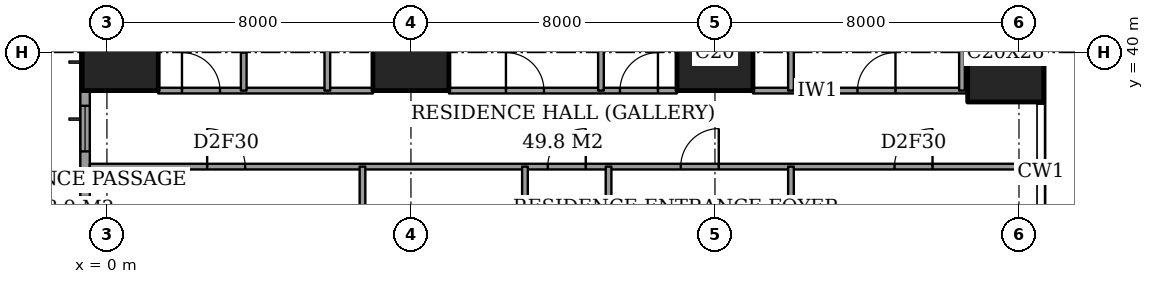
"""IFC4 building model, lengths in metres.
Left out: names, types, materials, properties, quantities, classifications, styles, units other than length and angle.
Written with IfcOpenShell. Run it as: python <this file> out.ifc"""

import sys

from ifc_helpers import new_model, si_unit, direction, frame, frame_2d, origin, origin_2d, place, context, subcontext, project, spatial, rectangle, extrude, element, fill, save


model = new_model("IFC4")
c1 = context("Model", 3, precision=1e-05, world=origin(), true_north=direction((0.0, 1.0)))
c2 = subcontext(c1, "Body", "Model", "MODEL_VIEW")
j1 = project(units=[si_unit("LENGTHUNIT", "METRE"), si_unit("PLANEANGLEUNIT", "RADIAN")], contexts=[c1])
p1 = place(None, origin())
s1 = spatial("IfcSite", under=j1, at=p1, CompositionType="ELEMENT")
p2 = place(p1, origin())
s2 = spatial("IfcBuilding", under=s1, at=p2, CompositionType="ELEMENT")
p3 = place(p2, frame((0.0, 0.0, 33.2)))
s3 = spatial("IfcBuildingStorey", under=s2, at=p3, CompositionType="ELEMENT", Elevation=33.2)
for number, where, z_axis, x_axis in (
    (1, (0.35, 40.0, 0.0), (0.0, 0.0, 1.0), (1.0, 0.0, 0.0)),
    (2, (8.0, 40.0, 0.0), (0.0, 0.0, 1.0), (1.0, 0.0, 0.0)),
    (3, (16.0, 40.0, 0.0), (0.0, 0.0, 1.0), (1.0, 0.0, 0.0)),
):
    element("IfcColumn", number, at=place(p3, frame(where, z_axis=z_axis, x_axis=x_axis)), inside=s3, PredefinedType="COLUMN", context=c2, shape_type="SweptSolid", body=[
        extrude(rectangle(XDim=2.0, YDim=2.0, at=origin_2d()), origin(), (0.0, 0.0, 1.0), 3.6),
    ])
p4 = place(p3, frame((23.65, 40.0, 0.0), z_axis=(0.0, 0.0, 1.0), x_axis=(1.0, 0.0, 0.0)))
e4 = element("IfcColumn", 4, at=p4, inside=s3, PredefinedType="COLUMN", context=c2, shape_type="SweptSolid", body=[
    extrude(rectangle(XDim=2.0, YDim=2.6, at=origin_2d()), origin(), (0.0, 0.0, 1.0), 3.6),
])
p5 = place(p3, frame((-0.575, 44.825, 0.0), z_axis=(0.0, 0.0, 1.0), x_axis=(0.0, -1.0, 0.0)))
e5 = element("IfcWall", 5, at=p5, inside=s3, PredefinedType="SOLIDWALL", context=c2, shape_type="SweptSolid", body=[
    extrude(rectangle(XDim=41.65, YDim=0.25, at=frame_2d((20.825, 0.0))), origin(), (0.0, 0.0, 1.0), 3.6),
])
p6 = place(p5, frame((0.775, 0.0, 0.6)))
e6 = element("IfcOpeningElement", 6, at=p6, cuts=e5, PredefinedType="OPENING", context=c2, shape_type="SweptSolid", body=[
    extrude(rectangle(XDim=2.4, YDim=2.0, at=frame_2d((1.2, 1.0))), frame((0.0, 0.135, 0.0), z_axis=(0.0, -1.0, 0.0), x_axis=(1.0, 0.0, 0.0)), (0.0, 0.0, 1.0), 0.27),
])
p7 = place(p5, frame((6.225, 0.0, 0.6)))
e7 = element("IfcOpeningElement", 7, at=p7, cuts=e5, PredefinedType="OPENING", context=c2, shape_type="SweptSolid", body=[
    extrude(rectangle(XDim=1.2, YDim=2.0, at=frame_2d((0.6, 1.0))), frame((0.0, 0.135, 0.0), z_axis=(0.0, -1.0, 0.0), x_axis=(1.0, 0.0, 0.0)), (0.0, 0.0, 1.0), 0.27),
])
p8 = place(p5, frame((8.625, 0.0, 0.6)))
e8 = element("IfcOpeningElement", 8, at=p8, cuts=e5, PredefinedType="OPENING", context=c2, shape_type="SweptSolid", body=[
    extrude(rectangle(XDim=2.4, YDim=2.0, at=frame_2d((1.2, 1.0))), frame((0.0, 0.135, 0.0), z_axis=(0.0, -1.0, 0.0), x_axis=(1.0, 0.0, 0.0)), (0.0, 0.0, 1.0), 0.27),
])
p9 = place(p5, frame((15.625, 0.0, 0.6)))
e9 = element("IfcOpeningElement", 9, at=p9, cuts=e5, PredefinedType="OPENING", context=c2, shape_type="SweptSolid", body=[
    extrude(rectangle(XDim=2.4, YDim=2.0, at=frame_2d((1.2, 1.0))), frame((0.0, 0.135, 0.0), z_axis=(0.0, -1.0, 0.0), x_axis=(1.0, 0.0, 0.0)), (0.0, 0.0, 1.0), 0.27),
])
p10 = place(p5, frame((23.625, 0.0, 0.6)))
e10 = element("IfcOpeningElement", 10, at=p10, cuts=e5, PredefinedType="OPENING", context=c2, shape_type="SweptSolid", body=[
    extrude(rectangle(XDim=2.4, YDim=2.0, at=frame_2d((1.2, 1.0))), frame((0.0, 0.135, 0.0), z_axis=(0.0, -1.0, 0.0), x_axis=(1.0, 0.0, 0.0)), (0.0, 0.0, 1.0), 0.27),
])
p11 = place(p5, frame((30.825, 0.0, 0.6)))
e11 = element("IfcOpeningElement", 11, at=p11, cuts=e5, PredefinedType="OPENING", context=c2, shape_type="SweptSolid", body=[
    extrude(rectangle(XDim=2.4, YDim=2.0, at=frame_2d((1.2, 1.0))), frame((0.0, 0.135, 0.0), z_axis=(0.0, -1.0, 0.0), x_axis=(1.0, 0.0, 0.0)), (0.0, 0.0, 1.0), 0.27),
])
p12 = place(p5, frame((34.5, 0.0, 0.6)))
e12 = element("IfcOpeningElement", 12, at=p12, cuts=e5, PredefinedType="OPENING", context=c2, shape_type="SweptSolid", body=[
    extrude(rectangle(XDim=1.2, YDim=2.0, at=frame_2d((0.6, 1.0))), frame((0.0, 0.135, 0.0), z_axis=(0.0, -1.0, 0.0), x_axis=(1.0, 0.0, 0.0)), (0.0, 0.0, 1.0), 0.27),
])
p13 = place(p5, frame((38.475, 0.0, 0.6)))
e13 = element("IfcOpeningElement", 13, at=p13, cuts=e5, PredefinedType="OPENING", context=c2, shape_type="SweptSolid", body=[
    extrude(rectangle(XDim=2.4, YDim=2.0, at=frame_2d((1.2, 1.0))), frame((0.0, 0.135, 0.0), z_axis=(0.0, -1.0, 0.0), x_axis=(1.0, 0.0, 0.0)), (0.0, 0.0, 1.0), 0.27),
])
p14 = place(p3, frame((-0.45, 37.0, 0.0), z_axis=(0.0, 0.0, 1.0), x_axis=(1.0, 0.0, 0.0)))
e14 = element("IfcWall", 14, at=p14, inside=s3, PredefinedType="PARTITIONING", context=c2, shape_type="SweptSolid", body=[
    extrude(rectangle(XDim=25.011, YDim=0.15, at=frame_2d((12.505, 0.0))), origin(), (0.0, 0.0, 1.0), 3.35),
])
p15 = place(p14, frame((12.05, 0.0, 0.0)))
e15 = element("IfcOpeningElement", 15, at=p15, cuts=e14, PredefinedType="OPENING", context=c2, shape_type="SweptSolid", body=[
    extrude(rectangle(XDim=1.0, YDim=2.1, at=frame_2d((0.5, 1.05))), frame((0.0, 0.085, 0.0), z_axis=(0.0, -1.0, 0.0), x_axis=(1.0, 0.0, 0.0)), (0.0, 0.0, 1.0), 0.17),
])
p16 = place(p14, frame((3.087, 0.0, 0.0)))
e16 = element("IfcOpeningElement", 16, at=p16, cuts=e14, PredefinedType="OPENING", context=c2, shape_type="SweptSolid", body=[
    extrude(rectangle(XDim=1.0, YDim=2.1, at=frame_2d((0.5, 1.05))), frame((0.0, 0.085, 0.0), z_axis=(0.0, -1.0, 0.0), x_axis=(1.0, 0.0, 0.0)), (0.0, 0.0, 1.0), 0.17),
])
p17 = place(p14, frame((15.55, 0.0, 0.0)))
e17 = element("IfcOpeningElement", 17, at=p17, cuts=e14, PredefinedType="OPENING", context=c2, shape_type="SweptSolid", body=[
    extrude(rectangle(XDim=1.0, YDim=2.1, at=frame_2d((0.5, 1.05))), frame((0.0, 0.085, 0.0), z_axis=(0.0, -1.0, 0.0), x_axis=(1.0, 0.0, 0.0)), (0.0, 0.0, 1.0), 0.17),
])
p18 = place(p14, frame((21.175, 0.0, 0.0)))
e18 = element("IfcOpeningElement", 18, at=p18, cuts=e14, PredefinedType="OPENING", context=c2, shape_type="SweptSolid", body=[
    extrude(rectangle(XDim=1.0, YDim=2.1, at=frame_2d((0.5, 1.05))), frame((0.0, 0.085, 0.0), z_axis=(0.0, -1.0, 0.0), x_axis=(1.0, 0.0, 0.0)), (0.0, 0.0, 1.0), 0.17),
])
p19 = place(p3, frame((1.35, 39.0, 0.0), z_axis=(0.0, 0.0, 1.0), x_axis=(1.0, 0.0, 0.0)))
e19 = element("IfcWall", 19, at=p19, inside=s3, PredefinedType="PARTITIONING", context=c2, shape_type="SweptSolid", body=[
    extrude(rectangle(XDim=5.65, YDim=0.15, at=frame_2d((2.825, 0.0))), origin(), (0.0, 0.0, 1.0), 3.35),
])
p20 = place(p19, frame((0.625, 0.0, 0.0)))
e20 = element("IfcOpeningElement", 20, at=p20, cuts=e19, PredefinedType="OPENING", context=c2, shape_type="SweptSolid", body=[
    extrude(rectangle(XDim=1.0, YDim=2.1, at=frame_2d((0.5, 1.05))), frame((0.0, 0.085, 0.0), z_axis=(0.0, -1.0, 0.0), x_axis=(1.0, 0.0, 0.0)), (0.0, 0.0, 1.0), 0.17),
])
p21 = place(p3, frame((9.0, 39.0, 0.0), z_axis=(0.0, 0.0, 1.0), x_axis=(1.0, 0.0, 0.0)))
e21 = element("IfcWall", 21, at=p21, inside=s3, PredefinedType="PARTITIONING", context=c2, shape_type="SweptSolid", body=[
    extrude(rectangle(XDim=6.0, YDim=0.15, at=frame_2d((3.0, 0.0))), origin(), (0.0, 0.0, 1.0), 3.35),
])
p22 = place(p21, frame((1.5, 0.0, 0.0)))
e22 = element("IfcOpeningElement", 22, at=p22, cuts=e21, PredefinedType="OPENING", context=c2, shape_type="SweptSolid", body=[
    extrude(rectangle(XDim=1.0, YDim=2.1, at=frame_2d((0.5, 1.05))), frame((0.0, 0.085, 0.0), z_axis=(0.0, -1.0, 0.0), x_axis=(1.0, 0.0, 0.0)), (0.0, 0.0, 1.0), 0.17),
])
p23 = place(p21, frame((4.5, 0.0, 0.0)))
e23 = element("IfcOpeningElement", 23, at=p23, cuts=e21, PredefinedType="OPENING", context=c2, shape_type="SweptSolid", body=[
    extrude(rectangle(XDim=1.0, YDim=2.1, at=frame_2d((0.5, 1.05))), frame((0.0, 0.085, 0.0), z_axis=(0.0, -1.0, 0.0), x_axis=(1.0, 0.0, 0.0)), (0.0, 0.0, 1.0), 0.17),
])
p24 = place(p3, frame((17.0, 39.0, 0.0), z_axis=(0.0, 0.0, 1.0), x_axis=(1.0, 0.0, 0.0)))
e24 = element("IfcWall", 24, at=p24, inside=s3, PredefinedType="PARTITIONING", context=c2, shape_type="SweptSolid", body=[
    extrude(rectangle(XDim=5.65, YDim=0.15, at=frame_2d((2.825, 0.0))), origin(), (0.0, 0.0, 1.0), 3.35),
])
p25 = place(p24, frame((2.75, 0.0, 0.0)))
e25 = element("IfcOpeningElement", 25, at=p25, cuts=e24, PredefinedType="OPENING", context=c2, shape_type="SweptSolid", body=[
    extrude(rectangle(XDim=1.0, YDim=2.1, at=frame_2d((0.5, 1.05))), frame((0.0, 0.085, 0.0), z_axis=(0.0, -1.0, 0.0), x_axis=(1.0, 0.0, 0.0)), (0.0, 0.0, 1.0), 0.17),
])
p26 = place(p3, frame((3.6, 39.0, 0.0), z_axis=(0.0, 0.0, 1.0), x_axis=(0.0, 1.0, 0.0)))
e26 = element("IfcWall", 26, at=p26, inside=s3, PredefinedType="PARTITIONING", context=c2, shape_type="SweptSolid", body=[
    extrude(rectangle(XDim=2.9, YDim=0.15, at=frame_2d((1.45, 0.0))), origin(), (0.0, 0.0, 1.0), 3.35),
])
p27 = place(p26, frame((1.0, 0.0, 0.0)))
e27 = element("IfcOpeningElement", 27, at=p27, cuts=e26, PredefinedType="OPENING", context=c2, shape_type="SweptSolid", body=[
    extrude(rectangle(XDim=0.9, YDim=2.1, at=frame_2d((0.45, 1.05))), frame((0.0, 0.085, 0.0), z_axis=(0.0, -1.0, 0.0), x_axis=(1.0, 0.0, 0.0)), (0.0, 0.0, 1.0), 0.17),
])
p28 = place(p3, frame((5.8, 39.0, 0.0), z_axis=(0.0, 0.0, 1.0), x_axis=(0.0, 1.0, 0.0)))
e28 = element("IfcWall", 28, at=p28, inside=s3, PredefinedType="PARTITIONING", context=c2, shape_type="SweptSolid", body=[
    extrude(rectangle(XDim=9.45, YDim=0.15, at=frame_2d((4.725, 0.0))), origin(), (0.0, 0.0, 1.0), 3.35),
])
p29 = place(p3, frame((6.725, 33.2, 0.0), z_axis=(0.0, 0.0, 1.0), x_axis=(0.0, 1.0, 0.0)))
e29 = element("IfcWall", 29, at=p29, inside=s3, PredefinedType="PARTITIONING", context=c2, shape_type="SweptSolid", body=[
    extrude(rectangle(XDim=3.8, YDim=0.15, at=frame_2d((1.9, 0.0))), origin(), (0.0, 0.0, 1.0), 3.35),
])
p30 = place(p29, frame((1.75, 0.0, 0.0)))
e30 = element("IfcOpeningElement", 30, at=p30, cuts=e29, PredefinedType="OPENING", context=c2, shape_type="SweptSolid", body=[
    extrude(rectangle(XDim=0.9, YDim=2.1, at=frame_2d((0.45, 1.05))), frame((0.0, 0.085, 0.0), z_axis=(0.0, -1.0, 0.0), x_axis=(1.0, 0.0, 0.0)), (0.0, 0.0, 1.0), 0.17),
])
p31 = place(p3, frame((11.0, 28.0, 0.0), z_axis=(0.0, 0.0, 1.0), x_axis=(0.0, 1.0, 0.0)))
e31 = element("IfcWall", 31, at=p31, inside=s3, PredefinedType="PARTITIONING", context=c2, shape_type="SweptSolid", body=[
    extrude(rectangle(XDim=9.0, YDim=0.15, at=frame_2d((4.5, 0.0))), origin(), (0.0, 0.0, 1.0), 3.35),
])
p32 = place(p31, frame((0.837, 0.0, 0.0)))
e32 = element("IfcOpeningElement", 32, at=p32, cuts=e31, PredefinedType="OPENING", context=c2, shape_type="SweptSolid", body=[
    extrude(rectangle(XDim=1.0, YDim=2.1, at=frame_2d((0.5, 1.05))), frame((0.0, 0.085, 0.0), z_axis=(0.0, -1.0, 0.0), x_axis=(1.0, 0.0, 0.0)), (0.0, 0.0, 1.0), 0.17),
])
p33 = place(p3, frame((13.0, 39.0, 0.0), z_axis=(0.0, 0.0, 1.0), x_axis=(0.0, 1.0, 0.0)))
e33 = element("IfcWall", 33, at=p33, inside=s3, PredefinedType="PARTITIONING", context=c2, shape_type="SweptSolid", body=[
    extrude(rectangle(XDim=9.45, YDim=0.15, at=frame_2d((4.725, 0.0))), origin(), (0.0, 0.0, 1.0), 3.35),
])
p34 = place(p3, frame((13.2, 30.675, 0.0), z_axis=(0.0, 0.0, 1.0), x_axis=(0.0, 1.0, 0.0)))
e34 = element("IfcWall", 34, at=p34, inside=s3, PredefinedType="PARTITIONING", context=c2, shape_type="SweptSolid", body=[
    extrude(rectangle(XDim=6.325, YDim=0.15, at=frame_2d((3.163, 0.0))), origin(), (0.0, 0.0, 1.0), 3.35),
])
p35 = place(p3, frame((18.0, 33.0, 0.0), z_axis=(0.0, 0.0, 1.0), x_axis=(0.0, 1.0, 0.0)))
e35 = element("IfcWall", 35, at=p35, inside=s3, PredefinedType="PARTITIONING", context=c2, shape_type="SweptSolid", body=[
    extrude(rectangle(XDim=4.0, YDim=0.15, at=frame_2d((2.0, 0.0))), origin(), (0.0, 0.0, 1.0), 3.35),
])
p36 = place(p3, frame((18.0, 39.0, 0.0), z_axis=(0.0, 0.0, 1.0), x_axis=(0.0, 1.0, 0.0)))
e36 = element("IfcWall", 36, at=p36, inside=s3, PredefinedType="PARTITIONING", context=c2, shape_type="SweptSolid", body=[
    extrude(rectangle(XDim=9.45, YDim=0.15, at=frame_2d((4.725, 0.0))), origin(), (0.0, 0.0, 1.0), 3.35),
])
p37 = place(p3, frame((22.5, 39.0, 0.0), z_axis=(0.0, 0.0, 1.0), x_axis=(0.0, 1.0, 0.0)))
e37 = element("IfcWall", 37, at=p37, inside=s3, PredefinedType="PARTITIONING", context=c2, shape_type="SweptSolid", body=[
    extrude(rectangle(XDim=9.45, YDim=0.15, at=frame_2d((4.725, 0.0))), origin(), (0.0, 0.0, 1.0), 3.35),
])
p38 = place(p37, frame((4.275, 0.0, 0.0)))
e38 = element("IfcOpeningElement", 38, at=p38, cuts=e37, PredefinedType="OPENING", context=c2, shape_type="SweptSolid", body=[
    extrude(rectangle(XDim=0.9, YDim=2.1, at=frame_2d((0.45, 1.05))), frame((0.0, 0.085, 0.0), z_axis=(0.0, -1.0, 0.0), x_axis=(1.0, 0.0, 0.0)), (0.0, 0.0, 1.0), 0.17),
])
p39 = place(p7, origin())
e39 = element("IfcWindow", 39, at=p39, inside=s3, PartitioningType="SINGLE_PANEL", PredefinedType="WINDOW", context=c2, shape_type="SweptSolid", body=[
    extrude(rectangle(XDim=1.2, YDim=2.0, at=frame_2d((0.6, 1.0))), frame((0.0, 0.03, 0.0), z_axis=(0.0, -1.0, 0.0), x_axis=(1.0, 0.0, 0.0)), (0.0, 0.0, 1.0), 0.06),
])
fill(e7, e39)
p40 = place(p8, origin())
e40 = element("IfcWindow", 40, at=p40, inside=s3, PartitioningType="SINGLE_PANEL", PredefinedType="WINDOW", context=c2, shape_type="SweptSolid", body=[
    extrude(rectangle(XDim=2.4, YDim=2.0, at=frame_2d((1.2, 1.0))), frame((0.0, 0.03, 0.0), z_axis=(0.0, -1.0, 0.0), x_axis=(1.0, 0.0, 0.0)), (0.0, 0.0, 1.0), 0.06),
])
fill(e8, e40)
p41 = place(p20, origin())
e41 = element("IfcDoor", 41, at=p41, inside=s3, OperationType="SINGLE_SWING_RIGHT", PredefinedType="DOOR", context=c2, shape_type="SweptSolid", body=[
    extrude(rectangle(XDim=1.0, YDim=2.1, at=frame_2d((0.5, 1.05))), frame((0.0, 0.025, 0.0), z_axis=(0.0, -1.0, 0.0), x_axis=(1.0, 0.0, 0.0)), (0.0, 0.0, 1.0), 0.05),
])
fill(e20, e41)
p42 = place(p22, origin())
e42 = element("IfcDoor", 42, at=p42, inside=s3, OperationType="SINGLE_SWING_RIGHT", PredefinedType="DOOR", context=c2, shape_type="SweptSolid", body=[
    extrude(rectangle(XDim=1.0, YDim=2.1, at=frame_2d((0.5, 1.05))), frame((0.0, 0.025, 0.0), z_axis=(0.0, -1.0, 0.0), x_axis=(1.0, 0.0, 0.0)), (0.0, 0.0, 1.0), 0.05),
])
fill(e22, e42)
p43 = place(p23, origin())
e43 = element("IfcDoor", 43, at=p43, inside=s3, OperationType="SINGLE_SWING_LEFT", PredefinedType="DOOR", context=c2, shape_type="SweptSolid", body=[
    extrude(rectangle(XDim=1.0, YDim=2.1, at=frame_2d((0.5, 1.05))), frame((0.0, 0.025, 0.0), z_axis=(0.0, -1.0, 0.0), x_axis=(1.0, 0.0, 0.0)), (0.0, 0.0, 1.0), 0.05),
])
fill(e23, e43)
p44 = place(p25, origin())
e44 = element("IfcDoor", 44, at=p44, inside=s3, OperationType="SINGLE_SWING_LEFT", PredefinedType="DOOR", context=c2, shape_type="SweptSolid", body=[
    extrude(rectangle(XDim=1.0, YDim=2.1, at=frame_2d((0.5, 1.05))), frame((0.0, 0.025, 0.0), z_axis=(0.0, -1.0, 0.0), x_axis=(1.0, 0.0, 0.0)), (0.0, 0.0, 1.0), 0.05),
])
fill(e25, e44)
p45 = place(p15, origin())
e45 = element("IfcDoor", 45, at=p45, inside=s3, OperationType="SINGLE_SWING_LEFT", PredefinedType="DOOR", context=c2, shape_type="SweptSolid", body=[
    extrude(rectangle(XDim=1.0, YDim=2.1, at=frame_2d((0.5, 1.05))), frame((0.0, 0.025, 0.0), z_axis=(0.0, -1.0, 0.0), x_axis=(1.0, 0.0, 0.0)), (0.0, 0.0, 1.0), 0.05),
])
fill(e15, e45)
p46 = place(p16, origin())
e46 = element("IfcDoor", 46, at=p46, inside=s3, OperationType="SINGLE_SWING_RIGHT", PredefinedType="DOOR", context=c2, shape_type="SweptSolid", body=[
    extrude(rectangle(XDim=1.0, YDim=2.1, at=frame_2d((0.5, 1.05))), frame((0.0, 0.025, 0.0), z_axis=(0.0, -1.0, 0.0), x_axis=(1.0, 0.0, 0.0)), (0.0, 0.0, 1.0), 0.05),
])
fill(e16, e46)
p47 = place(p17, origin())
e47 = element("IfcDoor", 47, at=p47, inside=s3, OperationType="SINGLE_SWING_LEFT", PredefinedType="DOOR", context=c2, shape_type="SweptSolid", body=[
    extrude(rectangle(XDim=1.0, YDim=2.1, at=frame_2d((0.5, 1.05))), frame((0.0, 0.025, 0.0), z_axis=(0.0, -1.0, 0.0), x_axis=(1.0, 0.0, 0.0)), (0.0, 0.0, 1.0), 0.05),
])
fill(e17, e47)
p48 = place(p18, origin())
e48 = element("IfcDoor", 48, at=p48, inside=s3, OperationType="SINGLE_SWING_LEFT", PredefinedType="DOOR", context=c2, shape_type="SweptSolid", body=[
    extrude(rectangle(XDim=1.0, YDim=2.1, at=frame_2d((0.5, 1.05))), frame((0.0, 0.025, 0.0), z_axis=(0.0, -1.0, 0.0), x_axis=(1.0, 0.0, 0.0)), (0.0, 0.0, 1.0), 0.05),
])
fill(e18, e48)
save(model, sys.argv[1])
